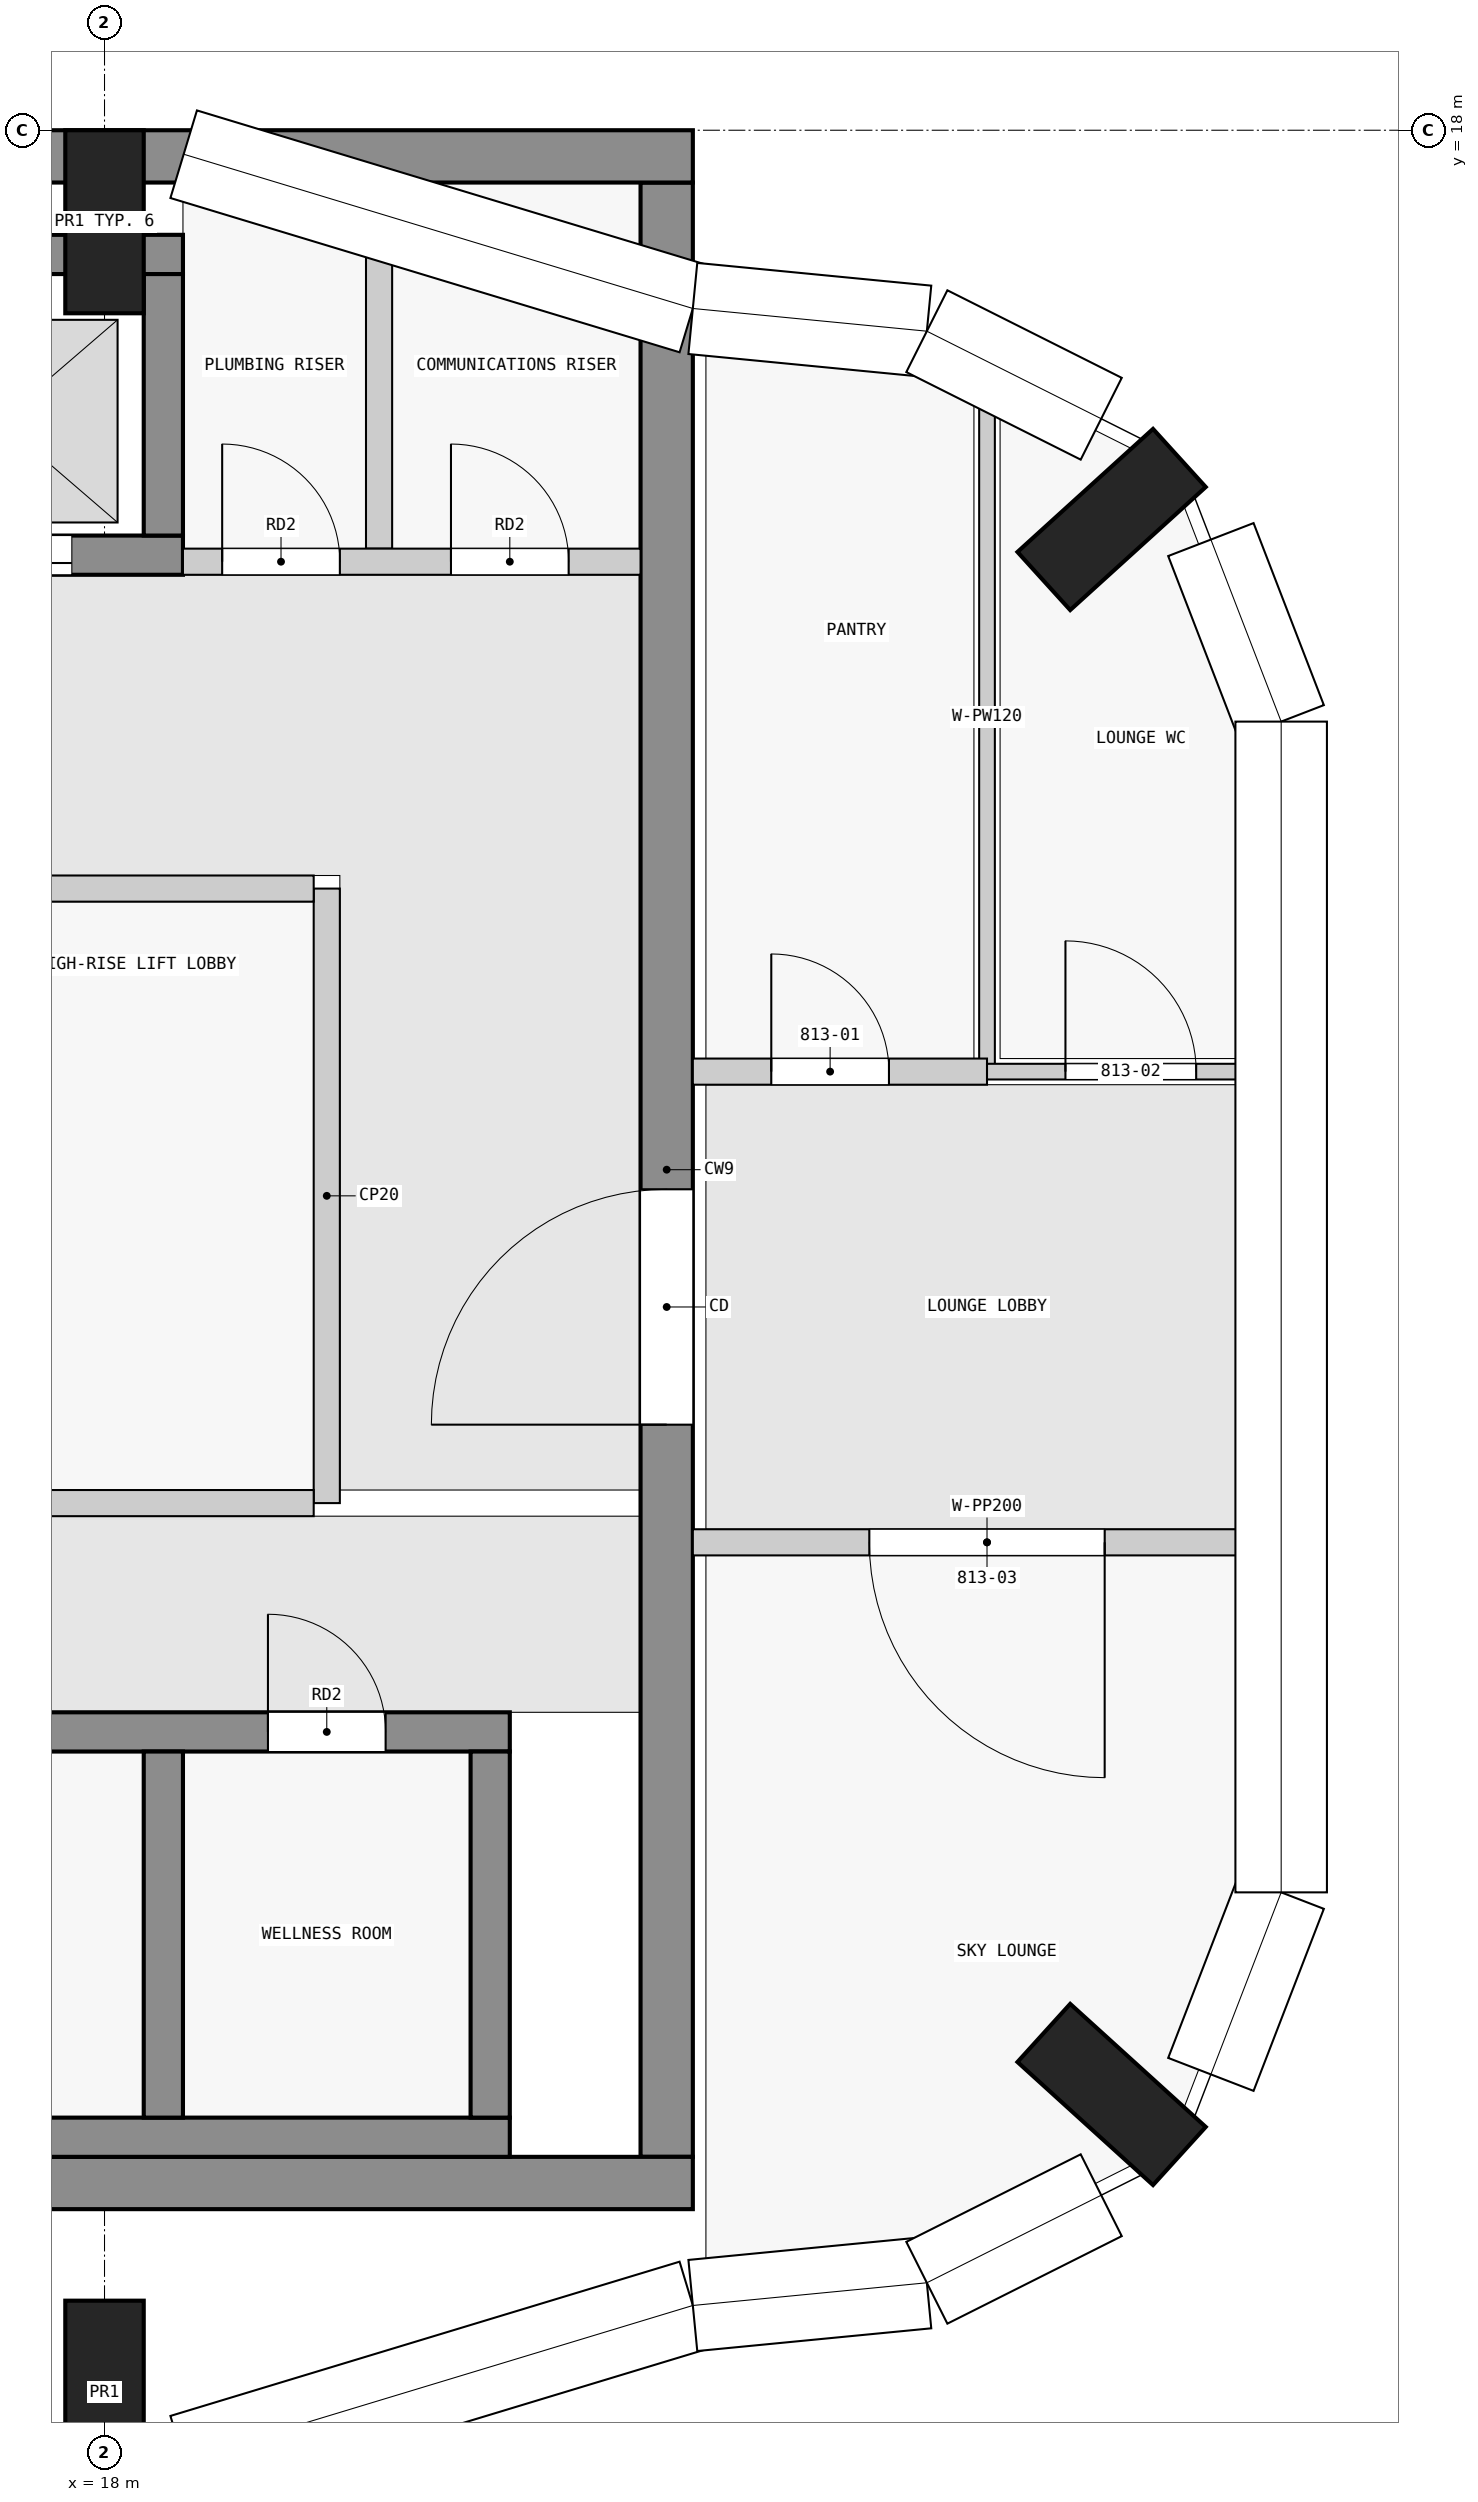
"""IFC4 building model, lengths in metres.
Left out: names, types, materials, properties, quantities, classifications, styles, units other than length and angle.
Written with IfcOpenShell. Run it as: python <this file> out.ifc"""

import sys

from ifc_helpers import new_model, si_unit, direction, frame, frame_2d, origin, origin_2d, place, context, subcontext, project, spatial, rectangle, extrude, element, fill, save


model = new_model("IFC4")
c1 = context("Model", 3, precision=1e-05, world=origin(), true_north=direction((0.0, 1.0)))
c2 = subcontext(c1, "Body", "Model", "MODEL_VIEW")
j1 = project(units=[si_unit("LENGTHUNIT", "METRE"), si_unit("PLANEANGLEUNIT", "RADIAN")], contexts=[c1])
p1 = place(None, origin())
s1 = spatial("IfcSite", under=j1, at=p1, CompositionType="ELEMENT")
p2 = place(p1, origin())
s2 = spatial("IfcBuilding", under=s1, at=p2, CompositionType="ELEMENT")
p3 = place(p2, frame((0.0, 0.0, 305.4)))
s3 = spatial("IfcBuildingStorey", under=s2, at=p3, CompositionType="ELEMENT", Elevation=305.4)
for number, where, z_axis, x_axis in (
    (1, (18.0, 0.7, 0.0), (0.0, 0.0, 1.0), (1.0, 0.0, 0.0)),
    (2, (25.703, 2.977, 0.0), (0.0, 0.0, 1.0), (0.672, 0.74, 0.0)),
    (3, (25.703, 15.023, 0.0), (0.0, 0.0, 1.0), (-0.672, 0.74, 0.0)),
    (4, (18.0, 17.3, 0.0), (0.0, 0.0, 1.0), (1.0, 0.0, 0.0)),
):
    element("IfcColumn", number, at=place(p3, frame(where, z_axis=z_axis, x_axis=x_axis)), inside=s3, PredefinedType="COLUMN", context=c2, shape_type="SweptSolid", body=[
        extrude(rectangle(XDim=0.6, YDim=1.4, at=origin_2d()), origin(), (0.0, 0.0, 1.0), 3.5),
    ])
for number, where, z_axis, x_axis in (
    (5, (1.9, 2.3, 0.0), (0.0, 0.0, 1.0), (1.0, 0.0, 0.0)),
    (6, (1.9, 17.8, 0.0), (0.0, 0.0, 1.0), (1.0, 0.0, 0.0)),
):
    element("IfcWall", number, at=place(p3, frame(where, z_axis=z_axis, x_axis=x_axis)), inside=s3, PredefinedType="SHEAR", context=c2, shape_type="SweptSolid", body=[
        extrude(rectangle(XDim=20.6, YDim=0.4, at=frame_2d((10.3, 0.0))), origin(), (0.0, 0.0, 1.0), 3.25),
    ])
p4 = place(p3, frame((22.3, 2.5, 0.0), z_axis=(0.0, 0.0, 1.0), x_axis=(0.0, 1.0, 0.0)))
e7 = element("IfcWall", 7, at=p4, inside=s3, PredefinedType="SHEAR", context=c2, shape_type="SweptSolid", body=[
    extrude(rectangle(XDim=15.1, YDim=0.4, at=frame_2d((7.55, 0.0))), origin(), (0.0, 0.0, 1.0), 3.25),
])
p5 = place(p4, frame((5.6, 0.0, 0.0)))
e8 = element("IfcOpeningElement", 8, at=p5, cuts=e7, PredefinedType="OPENING", context=c2, shape_type="SweptSolid", body=[
    extrude(rectangle(XDim=1.8, YDim=2.1, at=frame_2d((0.9, 1.05))), frame((0.0, 0.21, 0.0), z_axis=(0.0, -1.0, 0.0), x_axis=(1.0, 0.0, 0.0)), (0.0, 0.0, 1.0), 0.42),
])
p6 = place(p3, frame((13.3, 2.65, 0.0), z_axis=(0.0, 0.0, 1.0), x_axis=(1.0, 0.0, 0.0)))
e9 = element("IfcWall", 9, at=p6, inside=s3, PredefinedType="SHEAR", context=c2, shape_type="SweptSolid", body=[
    extrude(rectangle(XDim=7.8, YDim=0.3, at=frame_2d((3.9, 0.0))), origin(), (0.0, 0.0, 1.0), 3.25),
])
for number, where, z_axis, x_axis in (
    (10, (18.45, 2.8, 0.0), (0.0, 0.0, 1.0), (0.0, 1.0, 0.0)),
    (11, (20.95, 2.8, 0.0), (0.0, 0.0, 1.0), (0.0, 1.0, 0.0)),
):
    element("IfcWall", number, at=place(p3, frame(where, z_axis=z_axis, x_axis=x_axis)), inside=s3, PredefinedType="SHEAR", context=c2, shape_type="SweptSolid", body=[
        extrude(rectangle(XDim=2.8, YDim=0.3, at=frame_2d((1.4, 0.0))), origin(), (0.0, 0.0, 1.0), 3.25),
    ])
p7 = place(p3, frame((2.3, 5.75, 0.0), z_axis=(0.0, 0.0, 1.0), x_axis=(1.0, 0.0, 0.0)))
e12 = element("IfcWall", 12, at=p7, inside=s3, PredefinedType="SHEAR", context=c2, shape_type="SweptSolid", body=[
    extrude(rectangle(XDim=18.8, YDim=0.3, at=frame_2d((9.4, 0.0))), origin(), (0.0, 0.0, 1.0), 3.25),
])
p8 = place(p7, frame((4.65, 0.0, 0.0)))
e13 = element("IfcOpeningElement", 13, at=p8, cuts=e12, PredefinedType="OPENING", context=c2, shape_type="SweptSolid", body=[
    extrude(rectangle(XDim=1.1, YDim=2.1, at=frame_2d((0.55, 1.05))), frame((0.0, 0.16, 0.0), z_axis=(0.0, -1.0, 0.0), x_axis=(1.0, 0.0, 0.0)), (0.0, 0.0, 1.0), 0.32),
])
p9 = place(p7, frame((0.45, 0.0, 0.0)))
e14 = element("IfcOpeningElement", 14, at=p9, cuts=e12, PredefinedType="OPENING", context=c2, shape_type="SweptSolid", body=[
    extrude(rectangle(XDim=1.1, YDim=2.1, at=frame_2d((0.55, 1.05))), frame((0.0, 0.16, 0.0), z_axis=(0.0, -1.0, 0.0), x_axis=(1.0, 0.0, 0.0)), (0.0, 0.0, 1.0), 0.32),
])
p10 = place(p7, frame((2.75, 0.0, 0.0)))
e15 = element("IfcOpeningElement", 15, at=p10, cuts=e12, PredefinedType="OPENING", context=c2, shape_type="SweptSolid", body=[
    extrude(rectangle(XDim=1.1, YDim=2.1, at=frame_2d((0.55, 1.05))), frame((0.0, 0.16, 0.0), z_axis=(0.0, -1.0, 0.0), x_axis=(1.0, 0.0, 0.0)), (0.0, 0.0, 1.0), 0.32),
])
p11 = place(p7, frame((13.2, 0.0, 0.0)))
e16 = element("IfcOpeningElement", 16, at=p11, cuts=e12, PredefinedType="OPENING", context=c2, shape_type="SweptSolid", body=[
    extrude(rectangle(XDim=0.9, YDim=2.1, at=frame_2d((0.45, 1.05))), frame((0.0, 0.16, 0.0), z_axis=(0.0, -1.0, 0.0), x_axis=(1.0, 0.0, 0.0)), (0.0, 0.0, 1.0), 0.32),
])
p12 = place(p7, frame((16.95, 0.0, 0.0)))
e17 = element("IfcOpeningElement", 17, at=p12, cuts=e12, PredefinedType="OPENING", context=c2, shape_type="SweptSolid", body=[
    extrude(rectangle(XDim=0.9, YDim=2.1, at=frame_2d((0.45, 1.05))), frame((0.0, 0.16, 0.0), z_axis=(0.0, -1.0, 0.0), x_axis=(1.0, 0.0, 0.0)), (0.0, 0.0, 1.0), 0.32),
])
p13 = place(p3, frame((10.8, 17.05, 0.0), z_axis=(0.0, 0.0, 1.0), x_axis=(1.0, 0.0, 0.0)))
e18 = element("IfcWall", 18, at=p13, inside=s3, PredefinedType="SHEAR", context=c2, shape_type="SweptSolid", body=[
    extrude(rectangle(XDim=7.8, YDim=0.3, at=frame_2d((3.9, 0.0))), origin(), (0.0, 0.0, 1.0), 3.25),
])
p14 = place(p3, frame((10.8, 14.75, 0.0), z_axis=(0.0, 0.0, 1.0), x_axis=(1.0, 0.0, 0.0)))
e19 = element("IfcWall", 19, at=p14, inside=s3, PredefinedType="SHEAR", context=c2, shape_type="SweptSolid", body=[
    extrude(rectangle(XDim=7.8, YDim=0.3, at=frame_2d((3.9, 0.0))), origin(), (0.0, 0.0, 1.0), 3.25),
])
p15 = place(p14, frame((0.85, 0.0, 0.0)))
e20 = element("IfcOpeningElement", 20, at=p15, cuts=e19, PredefinedType="OPENING", context=c2, shape_type="SweptSolid", body=[
    extrude(rectangle(XDim=1.1, YDim=2.1, at=frame_2d((0.55, 1.05))), frame((0.0, 0.16, 0.0), z_axis=(0.0, -1.0, 0.0), x_axis=(1.0, 0.0, 0.0)), (0.0, 0.0, 1.0), 0.32),
])
p16 = place(p14, frame((3.35, 0.0, 0.0)))
e21 = element("IfcOpeningElement", 21, at=p16, cuts=e19, PredefinedType="OPENING", context=c2, shape_type="SweptSolid", body=[
    extrude(rectangle(XDim=1.1, YDim=2.1, at=frame_2d((0.55, 1.05))), frame((0.0, 0.16, 0.0), z_axis=(0.0, -1.0, 0.0), x_axis=(1.0, 0.0, 0.0)), (0.0, 0.0, 1.0), 0.32),
])
p17 = place(p14, frame((5.85, 0.0, 0.0)))
e22 = element("IfcOpeningElement", 22, at=p17, cuts=e19, PredefinedType="OPENING", context=c2, shape_type="SweptSolid", body=[
    extrude(rectangle(XDim=1.1, YDim=2.1, at=frame_2d((0.55, 1.05))), frame((0.0, 0.16, 0.0), z_axis=(0.0, -1.0, 0.0), x_axis=(1.0, 0.0, 0.0)), (0.0, 0.0, 1.0), 0.32),
])
p18 = place(p3, frame((18.45, 14.9, 0.0), z_axis=(0.0, 0.0, 1.0), x_axis=(0.0, 1.0, 0.0)))
e23 = element("IfcWall", 23, at=p18, inside=s3, PredefinedType="SHEAR", context=c2, shape_type="SweptSolid", body=[
    extrude(rectangle(XDim=2.0, YDim=0.3, at=frame_2d((1.0, 0.0))), origin(), (0.0, 0.0, 1.0), 3.25),
])
p19 = place(p3, frame((10.9, 7.5, 0.0), z_axis=(0.0, 0.0, 1.0), x_axis=(1.0, 0.0, 0.0)))
e24 = element("IfcWall", 24, at=p19, inside=s3, PredefinedType="PARTITIONING", context=c2, shape_type="SweptSolid", body=[
    extrude(rectangle(XDim=8.7, YDim=0.2, at=frame_2d((4.35, 0.0))), origin(), (0.0, 0.0, 1.0), 3.25),
])
p20 = place(p3, frame((19.7, 7.5, 0.0), z_axis=(0.0, 0.0, 1.0), x_axis=(0.0, 1.0, 0.0)))
e25 = element("IfcWall", 25, at=p20, inside=s3, PredefinedType="PARTITIONING", context=c2, shape_type="SweptSolid", body=[
    extrude(rectangle(XDim=4.7, YDim=0.2, at=frame_2d((2.35, 0.0))), origin(), (0.0, 0.0, 1.0), 3.25),
])
p21 = place(p3, frame((10.9, 12.2, 0.0), z_axis=(0.0, 0.0, 1.0), x_axis=(1.0, 0.0, 0.0)))
e26 = element("IfcWall", 26, at=p21, inside=s3, PredefinedType="PARTITIONING", context=c2, shape_type="SweptSolid", body=[
    extrude(rectangle(XDim=8.7, YDim=0.2, at=frame_2d((4.35, 0.0))), origin(), (0.0, 0.0, 1.0), 3.25),
])
p22 = place(p21, frame((3.9, 0.0, 0.0)))
e27 = element("IfcOpeningElement", 27, at=p22, cuts=e26, PredefinedType="OPENING", context=c2, shape_type="SweptSolid", body=[
    extrude(rectangle(XDim=0.9, YDim=2.1, at=frame_2d((0.45, 1.05))), frame((0.0, 0.11, 0.0), z_axis=(0.0, -1.0, 0.0), x_axis=(1.0, 0.0, 0.0)), (0.0, 0.0, 1.0), 0.22),
])
p23 = place(p3, frame((18.6, 14.7, 0.0), z_axis=(0.0, 0.0, 1.0), x_axis=(1.0, 0.0, 0.0)))
e28 = element("IfcWall", 28, at=p23, inside=s3, PredefinedType="PARTITIONING", context=c2, shape_type="SweptSolid", body=[
    extrude(rectangle(XDim=3.5, YDim=0.2, at=frame_2d((1.75, 0.0))), origin(), (0.0, 0.0, 1.0), 3.25),
])
p24 = place(p23, frame((0.3, 0.0, 0.0)))
e29 = element("IfcOpeningElement", 29, at=p24, cuts=e28, PredefinedType="OPENING", context=c2, shape_type="SweptSolid", body=[
    extrude(rectangle(XDim=0.9, YDim=2.1, at=frame_2d((0.45, 1.05))), frame((0.0, 0.11, 0.0), z_axis=(0.0, -1.0, 0.0), x_axis=(1.0, 0.0, 0.0)), (0.0, 0.0, 1.0), 0.22),
])
p25 = place(p23, frame((2.05, 0.0, 0.0)))
e30 = element("IfcOpeningElement", 30, at=p25, cuts=e28, PredefinedType="OPENING", context=c2, shape_type="SweptSolid", body=[
    extrude(rectangle(XDim=0.9, YDim=2.1, at=frame_2d((0.45, 1.05))), frame((0.0, 0.11, 0.0), z_axis=(0.0, -1.0, 0.0), x_axis=(1.0, 0.0, 0.0)), (0.0, 0.0, 1.0), 0.22),
])
p26 = place(p3, frame((20.1, 14.8, 0.0), z_axis=(0.0, 0.0, 1.0), x_axis=(0.0, 1.0, 0.0)))
e31 = element("IfcWall", 31, at=p26, inside=s3, PredefinedType="PARTITIONING", context=c2, shape_type="SweptSolid", body=[
    extrude(rectangle(XDim=2.8, YDim=0.2, at=frame_2d((1.4, 0.0))), origin(), (0.0, 0.0, 1.0), 3.25),
])
p27 = place(p3, frame((24.75, 16.232, 0.0), z_axis=(0.0, 0.0, 1.0), x_axis=(0.0, -1.0, 0.0)))
e32 = element("IfcWall", 32, at=p27, inside=s3, PredefinedType="PARTITIONING", context=c2, shape_type="SweptSolid", body=[
    extrude(rectangle(XDim=5.432, YDim=0.12, at=frame_2d((2.716, 0.0))), origin(), (0.0, 0.0, 1.0), 2.797),
])
p28 = place(p3, frame((27.0, 7.2, 0.0), z_axis=(0.0, 0.0, 1.0), x_axis=(-1.0, 0.0, 0.0)))
e33 = element("IfcWall", 33, at=p28, inside=s3, PredefinedType="PARTITIONING", context=c2, shape_type="SweptSolid", body=[
    extrude(rectangle(XDim=4.5, YDim=0.2, at=frame_2d((2.25, 0.0))), origin(), (0.0, 0.0, 1.0), 2.642),
])
p29 = place(p28, frame((1.35, 0.0, 0.0)))
e34 = element("IfcOpeningElement", 34, at=p29, cuts=e33, PredefinedType="OPENING", context=c2, shape_type="SweptSolid", body=[
    extrude(rectangle(XDim=1.8, YDim=2.1, at=frame_2d((0.9, 1.05))), frame((0.0, 0.11, 0.0), z_axis=(0.0, -1.0, 0.0), x_axis=(1.0, 0.0, 0.0)), (0.0, 0.0, 1.0), 0.22),
])
p30 = place(p3, frame((22.5, 10.8, 0.0), z_axis=(0.0, 0.0, 1.0), x_axis=(1.0, 0.0, 0.0)))
e35 = element("IfcWall", 35, at=p30, inside=s3, PredefinedType="PARTITIONING", context=c2, shape_type="SweptSolid", body=[
    extrude(rectangle(XDim=2.25, YDim=0.2, at=frame_2d((1.125, 0.0))), origin(), (0.0, 0.0, 1.0), 3.25),
])
p31 = place(p30, frame((0.6, 0.0, 0.0)))
e36 = element("IfcOpeningElement", 36, at=p31, cuts=e35, PredefinedType="OPENING", context=c2, shape_type="SweptSolid", body=[
    extrude(rectangle(XDim=0.9, YDim=2.1, at=frame_2d((0.45, 1.05))), frame((0.0, 0.11, 0.0), z_axis=(0.0, -1.0, 0.0), x_axis=(1.0, 0.0, 0.0)), (0.0, 0.0, 1.0), 0.22),
])
p32 = place(p3, frame((24.75, 10.8, 0.0), z_axis=(0.0, 0.0, 1.0), x_axis=(1.0, 0.0, 0.0)))
e37 = element("IfcWall", 37, at=p32, inside=s3, PredefinedType="PARTITIONING", context=c2, shape_type="SweptSolid", body=[
    extrude(rectangle(XDim=2.25, YDim=0.12, at=frame_2d((1.125, 0.0))), origin(), (0.0, 0.0, 1.0), 2.642),
])
p33 = place(p32, frame((0.6, 0.0, 0.0)))
e38 = element("IfcOpeningElement", 38, at=p33, cuts=e37, PredefinedType="OPENING", context=c2, shape_type="SweptSolid", body=[
    extrude(rectangle(XDim=1.0, YDim=2.1, at=frame_2d((0.5, 1.05))), frame((0.0, 0.07, 0.0), z_axis=(0.0, -1.0, 0.0), x_axis=(1.0, 0.0, 0.0)), (0.0, 0.0, 1.0), 0.14),
])
p34 = place(p17, origin())
e39 = element("IfcDoor", 39, at=p34, inside=s3, OperationType="DOUBLE_DOOR_SLIDING", PredefinedType="DOOR", context=c2, shape_type="SweptSolid", body=[
    extrude(rectangle(XDim=1.1, YDim=2.1, at=frame_2d((0.55, 1.05))), frame((0.0, 0.025, 0.0), z_axis=(0.0, -1.0, 0.0), x_axis=(1.0, 0.0, 0.0)), (0.0, 0.0, 1.0), 0.05),
])
fill(e22, e39)
p35 = place(p5, origin())
e40 = element("IfcDoor", 40, at=p35, inside=s3, OperationType="DOUBLE_DOOR_SINGLE_SWING", PredefinedType="DOOR", context=c2, shape_type="SweptSolid", body=[
    extrude(rectangle(XDim=1.8, YDim=2.1, at=frame_2d((0.9, 1.05))), frame((0.0, 0.025, 0.0), z_axis=(0.0, -1.0, 0.0), x_axis=(1.0, 0.0, 0.0)), (0.0, 0.0, 1.0), 0.05),
])
fill(e8, e40)
p36 = place(p24, origin())
e41 = element("IfcDoor", 41, at=p36, inside=s3, OperationType="SINGLE_SWING_LEFT", PredefinedType="DOOR", context=c2, shape_type="SweptSolid", body=[
    extrude(rectangle(XDim=0.9, YDim=2.1, at=frame_2d((0.45, 1.05))), frame((0.0, 0.025, 0.0), z_axis=(0.0, -1.0, 0.0), x_axis=(1.0, 0.0, 0.0)), (0.0, 0.0, 1.0), 0.05),
])
fill(e29, e41)
p37 = place(p25, origin())
e42 = element("IfcDoor", 42, at=p37, inside=s3, OperationType="SINGLE_SWING_LEFT", PredefinedType="DOOR", context=c2, shape_type="SweptSolid", body=[
    extrude(rectangle(XDim=0.9, YDim=2.1, at=frame_2d((0.45, 1.05))), frame((0.0, 0.025, 0.0), z_axis=(0.0, -1.0, 0.0), x_axis=(1.0, 0.0, 0.0)), (0.0, 0.0, 1.0), 0.05),
])
fill(e30, e42)
p38 = place(p12, origin())
e43 = element("IfcDoor", 43, at=p38, inside=s3, OperationType="SINGLE_SWING_LEFT", PredefinedType="DOOR", context=c2, shape_type="SweptSolid", body=[
    extrude(rectangle(XDim=0.9, YDim=2.1, at=frame_2d((0.45, 1.05))), frame((0.0, 0.025, 0.0), z_axis=(0.0, -1.0, 0.0), x_axis=(1.0, 0.0, 0.0)), (0.0, 0.0, 1.0), 0.05),
])
fill(e17, e43)
p39 = place(p31, origin())
e44 = element("IfcDoor", 44, at=p39, inside=s3, OperationType="SINGLE_SWING_LEFT", PredefinedType="DOOR", context=c2, shape_type="SweptSolid", body=[
    extrude(rectangle(XDim=0.9, YDim=2.1, at=frame_2d((0.45, 1.05))), frame((0.0, 0.025, 0.0), z_axis=(0.0, -1.0, 0.0), x_axis=(1.0, 0.0, 0.0)), (0.0, 0.0, 1.0), 0.05),
])
fill(e36, e44)
p40 = place(p33, origin())
e45 = element("IfcDoor", 45, at=p40, inside=s3, OperationType="SINGLE_SWING_LEFT", PredefinedType="DOOR", context=c2, shape_type="SweptSolid", body=[
    extrude(rectangle(XDim=1.0, YDim=2.1, at=frame_2d((0.5, 1.05))), frame((0.0, 0.025, 0.0), z_axis=(0.0, -1.0, 0.0), x_axis=(1.0, 0.0, 0.0)), (0.0, 0.0, 1.0), 0.05),
])
fill(e38, e45)
p41 = place(p29, origin())
e46 = element("IfcDoor", 46, at=p41, inside=s3, OperationType="DOUBLE_DOOR_SINGLE_SWING", PredefinedType="DOOR", context=c2, shape_type="SweptSolid", body=[
    extrude(rectangle(XDim=1.8, YDim=2.1, at=frame_2d((0.9, 1.05))), frame((0.0, 0.025, 0.0), z_axis=(0.0, -1.0, 0.0), x_axis=(1.0, 0.0, 0.0)), (0.0, 0.0, 1.0), 0.05),
])
fill(e34, e46)
save(model, sys.argv[1])
